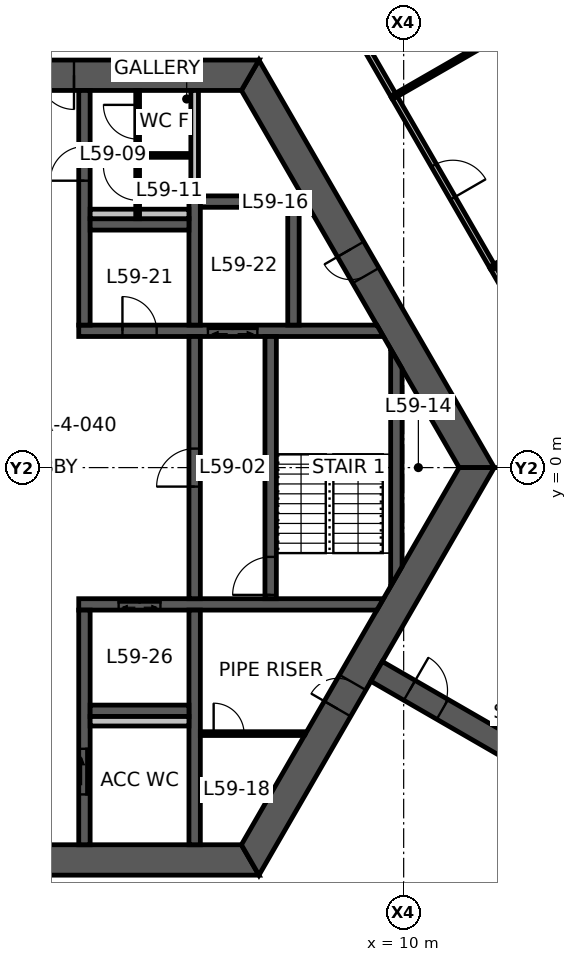
"""IFC4 building model, lengths in metres.
Left out: names, types, materials, properties, quantities, classifications, styles, units other than length and angle.
Written with IfcOpenShell. Run it as: python <this file> out.ifc"""

import sys

from ifc_helpers import new_model, si_unit, direction, frame, frame_2d, origin, place, context, subcontext, project, spatial, polyline, rectangle, outline, extrude, element, fill, save


model = new_model("IFC4")
c1 = context("Model", 3, precision=1e-05, world=origin(), true_north=direction((0.0, 1.0)))
c2 = subcontext(c1, "Body", "Model", "MODEL_VIEW")
j1 = project(units=[si_unit("LENGTHUNIT", "METRE"), si_unit("PLANEANGLEUNIT", "RADIAN")], contexts=[c1])
p1 = place(None, origin())
s1 = spatial("IfcSite", under=j1, at=p1, CompositionType="ELEMENT")
p2 = place(p1, origin())
s2 = spatial("IfcBuilding", under=s1, at=p2, CompositionType="ELEMENT")
p3 = place(p2, frame((0.0, 0.0, 236.2)))
s3 = spatial("IfcBuildingStorey", under=s2, at=p3, CompositionType="ELEMENT", Elevation=236.2)
p4 = place(p3, frame((11.922, 0.0, 0.0), z_axis=(0.0, 0.0, 1.0), x_axis=(-0.500004296715, 0.866022923061, 0.0)))
e1 = element("IfcWall", 1, at=p4, inside=s3, PredefinedType="SHEAR", context=c2, shape_type="SweptSolid", body=[
    extrude(outline(polyline([(-0.231, -0.4), (5.835, -0.4), (6.635, -0.4), (12.153, -0.4), (11.691, 0.4), (6.635, 0.4), (5.835, 0.4), (0.231, 0.4), (-0.231, -0.4)])), origin(), (0.0, 0.0, 1.0), 3.9),
])
p5 = place(p4, frame((5.835, 0.0, 0.0)))
e2 = element("IfcOpeningElement", 2, at=p5, cuts=e1, PredefinedType="OPENING", context=c2, shape_type="SweptSolid", body=[
    extrude(rectangle(XDim=0.8, YDim=2.1, at=frame_2d((0.4, 1.05))), frame((0.0, 0.41, 0.0), z_axis=(0.0, -1.0, 0.0), x_axis=(1.0, 0.0, 0.0)), (0.0, 0.0, 1.0), 0.82),
])
p6 = place(p3, frame((5.961, 10.325, 0.0), z_axis=(0.0, 0.0, 1.0), x_axis=(-1.0, 0.0, 0.0)))
e3 = element("IfcWall", 3, at=p6, inside=s3, PredefinedType="SHEAR", context=c2, shape_type="SweptSolid", body=[
    extrude(outline(polyline([(-0.231, -0.4), (4.636, -0.4), (5.536, -0.4), (6.386, -0.4), (7.286, -0.4), (12.153, -0.4), (11.691, 0.4), (7.286, 0.4), (6.386, 0.4), (5.536, 0.4), (4.636, 0.4), (0.231, 0.4), (-0.231, -0.4)])), origin(), (0.0, 0.0, 1.0), 3.9),
])
p7 = place(p6, frame((6.386, 0.0, 0.0)))
e4 = element("IfcOpeningElement", 4, at=p7, cuts=e3, PredefinedType="OPENING", context=c2, shape_type="SweptSolid", body=[
    extrude(rectangle(XDim=0.9, YDim=2.1, at=frame_2d((0.45, 1.05))), frame((0.0, 0.41, 0.0), z_axis=(0.0, -1.0, 0.0), x_axis=(1.0, 0.0, 0.0)), (0.0, 0.0, 1.0), 0.82),
])
p8 = place(p6, frame((4.636, 0.0, 0.0)))
e5 = element("IfcOpeningElement", 5, at=p8, cuts=e3, PredefinedType="OPENING", context=c2, shape_type="SweptSolid", body=[
    extrude(rectangle(XDim=0.9, YDim=2.1, at=frame_2d((0.45, 1.05))), frame((0.0, 0.41, 0.0), z_axis=(0.0, -1.0, 0.0), x_axis=(1.0, 0.0, 0.0)), (0.0, 0.0, 1.0), 0.82),
])
p9 = place(p3, frame((-5.961, -10.325, 0.0), z_axis=(0.0, 0.0, 1.0), x_axis=(1.0, 0.0, 0.0)))
e6 = element("IfcWall", 6, at=p9, inside=s3, PredefinedType="SHEAR", context=c2, shape_type="SweptSolid", body=[
    extrude(outline(polyline([(-0.231, -0.4), (5.461, -0.4), (6.461, -0.4), (12.153, -0.4), (11.691, 0.4), (6.461, 0.4), (5.461, 0.4), (0.231, 0.4), (-0.231, -0.4)])), origin(), (0.0, 0.0, 1.0), 3.9),
])
p10 = place(p9, frame((5.461, 0.0, 0.0)))
e7 = element("IfcOpeningElement", 7, at=p10, cuts=e6, PredefinedType="OPENING", context=c2, shape_type="SweptSolid", body=[
    extrude(rectangle(XDim=1.0, YDim=2.1, at=frame_2d((0.5, 1.05))), frame((0.0, 0.41, 0.0), z_axis=(0.0, -1.0, 0.0), x_axis=(1.0, 0.0, 0.0)), (0.0, 0.0, 1.0), 0.82),
])
p11 = place(p3, frame((5.961, -10.325, 0.0), z_axis=(0.0, 0.0, 1.0), x_axis=(0.500004296715, 0.866022923061, 0.0)))
e8 = element("IfcWall", 8, at=p11, inside=s3, PredefinedType="SHEAR", context=c2, shape_type="SweptSolid", body=[
    extrude(outline(polyline([(-0.231, -0.4), (4.594, -0.4), (5.394, -0.4), (12.153, -0.4), (11.691, 0.4), (5.394, 0.4), (4.594, 0.4), (0.231, 0.4), (-0.231, -0.4)])), origin(), (0.0, 0.0, 1.0), 3.9),
])
p12 = place(p11, frame((4.594, 0.0, 0.0)))
e9 = element("IfcOpeningElement", 9, at=p12, cuts=e8, PredefinedType="OPENING", context=c2, shape_type="SweptSolid", body=[
    extrude(rectangle(XDim=0.8, YDim=2.1, at=frame_2d((0.4, 1.05))), frame((0.0, 0.41, 0.0), z_axis=(0.0, -1.0, 0.0), x_axis=(1.0, 0.0, 0.0)), (0.0, 0.0, 1.0), 0.82),
])
p13 = place(p3, frame((9.288, -5.363, 0.0), z_axis=(0.0, 0.0, 1.0), x_axis=(0.866031736626, -0.499989031036, 0.0)))
e10 = element("IfcWall", 10, at=p13, inside=s3, PredefinedType="SHEAR", context=c2, shape_type="SweptSolid", body=[
    extrude(rectangle(XDim=7.796, YDim=0.6, at=frame_2d((3.898, 0.0))), origin(), (0.0, 0.0, 1.0), 3.9),
])
p14 = place(p13, frame((1.0, 0.0, 0.0)))
e11 = element("IfcOpeningElement", 11, at=p14, cuts=e10, PredefinedType="OPENING", context=c2, shape_type="SweptSolid", body=[
    extrude(rectangle(XDim=1.0, YDim=2.1, at=frame_2d((0.5, 1.05))), frame((0.0, 0.31, 0.0), z_axis=(0.0, -1.0, 0.0), x_axis=(1.0, 0.0, 0.0)), (0.0, 0.0, 1.0), 0.62),
])
p15 = place(p3, frame((1.45, 3.6, 0.0), z_axis=(0.0, 0.0, 1.0), x_axis=(1.0, 0.0, 0.0)))
e12 = element("IfcWall", 12, at=p15, inside=s3, PredefinedType="SHEAR", context=c2, shape_type="SweptSolid", body=[
    extrude(outline(polyline([(0.0, -0.15), (1.15, -0.15), (2.05, -0.15), (3.4, -0.15), (4.7, -0.15), (8.019, -0.15), (7.845, 0.15), (4.7, 0.15), (3.4, 0.15), (2.05, 0.15), (1.15, 0.15), (0.0, 0.15), (0.0, -0.15)])), origin(), (0.0, 0.0, 1.0), 3.9),
])
p16 = place(p15, frame((1.15, 0.0, 0.0)))
e13 = element("IfcOpeningElement", 13, at=p16, cuts=e12, PredefinedType="OPENING", context=c2, shape_type="SweptSolid", body=[
    extrude(rectangle(XDim=0.9, YDim=2.1, at=frame_2d((0.45, 1.05))), frame((0.0, 0.16, 0.0), z_axis=(0.0, -1.0, 0.0), x_axis=(1.0, 0.0, 0.0)), (0.0, 0.0, 1.0), 0.32),
])
p17 = place(p15, frame((3.4, 0.0, 0.0)))
e14 = element("IfcOpeningElement", 14, at=p17, cuts=e12, PredefinedType="OPENING", context=c2, shape_type="SweptSolid", body=[
    extrude(rectangle(XDim=1.3, YDim=2.1, at=frame_2d((0.65, 1.05))), frame((0.0, 0.16, 0.0), z_axis=(0.0, -1.0, 0.0), x_axis=(1.0, 0.0, 0.0)), (0.0, 0.0, 1.0), 0.32),
])
p18 = place(p3, frame((1.45, -3.6, 0.0), z_axis=(0.0, 0.0, 1.0), x_axis=(1.0, 0.0, 0.0)))
e15 = element("IfcWall", 15, at=p18, inside=s3, PredefinedType="SHEAR", context=c2, shape_type="SweptSolid", body=[
    extrude(outline(polyline([(0.0, -0.15), (1.05, -0.15), (2.15, -0.15), (7.845, -0.15), (8.019, 0.15), (2.15, 0.15), (1.05, 0.15), (0.0, 0.15), (0.0, -0.15)])), origin(), (0.0, 0.0, 1.0), 3.9),
])
p19 = place(p18, frame((1.05, 0.0, 0.0)))
e16 = element("IfcOpeningElement", 16, at=p19, cuts=e15, PredefinedType="OPENING", context=c2, shape_type="SweptSolid", body=[
    extrude(rectangle(XDim=1.1, YDim=2.1, at=frame_2d((0.55, 1.05))), frame((0.0, 0.16, 0.0), z_axis=(0.0, -1.0, 0.0), x_axis=(1.0, 0.0, 0.0)), (0.0, 0.0, 1.0), 0.32),
])
p20 = place(p3, frame((1.6, 3.75, 0.0), z_axis=(0.0, 0.0, 1.0), x_axis=(0.0, 1.0, 0.0)))
e17 = element("IfcWall", 17, at=p20, inside=s3, PredefinedType="SHEAR", context=c2, shape_type="SweptSolid", body=[
    extrude(rectangle(XDim=6.175, YDim=0.3, at=frame_2d((3.087, 0.0))), origin(), (0.0, 0.0, 1.0), 3.9),
])
p21 = place(p20, frame((3.8, 0.0, 0.0)))
e18 = element("IfcOpeningElement", 18, at=p21, cuts=e17, PredefinedType="OPENING", context=c2, shape_type="SweptSolid", body=[
    extrude(rectangle(XDim=0.9, YDim=2.1, at=frame_2d((0.45, 1.05))), frame((0.0, 0.16, 0.0), z_axis=(0.0, -1.0, 0.0), x_axis=(1.0, 0.0, 0.0)), (0.0, 0.0, 1.0), 0.32),
])
p22 = place(p3, frame((1.6, -3.75, 0.0), z_axis=(0.0, 0.0, 1.0), x_axis=(0.0, -1.0, 0.0)))
e19 = element("IfcWall", 19, at=p22, inside=s3, PredefinedType="SHEAR", context=c2, shape_type="SweptSolid", body=[
    extrude(rectangle(XDim=6.175, YDim=0.3, at=frame_2d((3.087, 0.0))), origin(), (0.0, 0.0, 1.0), 3.9),
])
p23 = place(p22, frame((3.65, 0.0, 0.0)))
e20 = element("IfcOpeningElement", 20, at=p23, cuts=e19, PredefinedType="OPENING", context=c2, shape_type="SweptSolid", body=[
    extrude(rectangle(XDim=1.2, YDim=2.1, at=frame_2d((0.6, 1.05))), frame((0.0, 0.16, 0.0), z_axis=(0.0, -1.0, 0.0), x_axis=(1.0, 0.0, 0.0)), (0.0, 0.0, 1.0), 0.32),
])
p24 = place(p3, frame((4.5, -3.45, 0.0), z_axis=(0.0, 0.0, 1.0), x_axis=(0.0, 1.0, 0.0)))
e21 = element("IfcWall", 21, at=p24, inside=s3, PredefinedType="SHEAR", context=c2, shape_type="SweptSolid", body=[
    extrude(rectangle(XDim=6.9, YDim=0.3, at=frame_2d((3.45, 0.0))), origin(), (0.0, 0.0, 1.0), 3.9),
])
p25 = place(p24, frame((2.95, 0.0, 0.0)))
e22 = element("IfcOpeningElement", 22, at=p25, cuts=e21, PredefinedType="OPENING", context=c2, shape_type="SweptSolid", body=[
    extrude(rectangle(XDim=1.0, YDim=2.1, at=frame_2d((0.5, 1.05))), frame((0.0, 0.16, 0.0), z_axis=(0.0, -1.0, 0.0), x_axis=(1.0, 0.0, 0.0)), (0.0, 0.0, 1.0), 0.32),
])
p26 = place(p3, frame((6.5, -3.45, 0.0), z_axis=(0.0, 0.0, 1.0), x_axis=(0.0, 1.0, 0.0)))
e23 = element("IfcWall", 23, at=p26, inside=s3, PredefinedType="SHEAR", context=c2, shape_type="SweptSolid", body=[
    extrude(rectangle(XDim=6.9, YDim=0.3, at=frame_2d((3.45, 0.0))), origin(), (0.0, 0.0, 1.0), 3.9),
])
p27 = place(p26, frame((0.1, 0.0, 0.0)))
e24 = element("IfcOpeningElement", 24, at=p27, cuts=e23, PredefinedType="OPENING", context=c2, shape_type="SweptSolid", body=[
    extrude(rectangle(XDim=1.0, YDim=2.1, at=frame_2d((0.5, 1.05))), frame((0.0, 0.16, 0.0), z_axis=(0.0, -1.0, 0.0), x_axis=(1.0, 0.0, 0.0)), (0.0, 0.0, 1.0), 0.32),
])
p28 = place(p3, frame((4.5, 3.75, 0.0), z_axis=(0.0, 0.0, 1.0), x_axis=(0.0, 1.0, 0.0)))
e25 = element("IfcWall", 25, at=p28, inside=s3, PredefinedType="SHEAR", context=c2, shape_type="SweptSolid", body=[
    extrude(rectangle(XDim=3.4, YDim=0.3, at=frame_2d((1.7, 0.0))), origin(), (0.0, 0.0, 1.0), 3.9),
])
p29 = place(p3, frame((4.5, -3.75, 0.0), z_axis=(0.0, 0.0, 1.0), x_axis=(0.0, -1.0, 0.0)))
e26 = element("IfcWall", 26, at=p29, inside=s3, PredefinedType="SHEAR", context=c2, shape_type="SweptSolid", body=[
    extrude(rectangle(XDim=6.175, YDim=0.3, at=frame_2d((3.087, 0.0))), origin(), (0.0, 0.0, 1.0), 3.9),
])
for number, where, z_axis, x_axis in (
    (27, (1.75, 6.4, 0.0), (0.0, 0.0, 1.0), (1.0, 0.0, 0.0)),
    (28, (1.75, -6.4, 0.0), (0.0, 0.0, 1.0), (1.0, 0.0, 0.0)),
    (29, (4.65, 7.0, 0.0), (0.0, 0.0, 1.0), (1.0, 0.0, 0.0)),
):
    element("IfcWall", number, at=place(p3, frame(where, z_axis=z_axis, x_axis=x_axis)), inside=s3, PredefinedType="SHEAR", context=c2, shape_type="SweptSolid", body=[
        extrude(rectangle(XDim=2.6, YDim=0.3, at=frame_2d((1.3, 0.0))), origin(), (0.0, 0.0, 1.0), 3.9),
    ])
p30 = place(p3, frame((7.1, 3.75, 0.0), z_axis=(0.0, 0.0, 1.0), x_axis=(0.0, 1.0, 0.0)))
e30 = element("IfcWall", 30, at=p30, inside=s3, PredefinedType="SHEAR", context=c2, shape_type="SweptSolid", body=[
    extrude(rectangle(XDim=3.1, YDim=0.3, at=frame_2d((1.55, 0.0))), origin(), (0.0, 0.0, 1.0), 3.9),
])
p31 = place(p3, frame((9.808, -2.862, 0.0), z_axis=(0.0, 0.0, 1.0), x_axis=(0.0, 1.0, 0.0)))
e31 = element("IfcWall", 31, at=p31, inside=s3, PredefinedType="SHEAR", context=c2, shape_type="SweptSolid", body=[
    extrude(outline(polyline([(0.26, -0.15), (5.465, -0.15), (5.984, 0.15), (-0.26, 0.15), (0.26, -0.15)])), origin(), (0.0, 0.0, 1.0), 3.9),
])
p32 = place(p3, frame((4.5, 7.15, 0.0), z_axis=(0.0, 0.0, 1.0), x_axis=(0.0, 1.0, 0.0)))
e32 = element("IfcWall", 32, at=p32, inside=s3, PredefinedType="STANDARD", context=c2, shape_type="SweptSolid", body=[
    extrude(rectangle(XDim=2.775, YDim=0.2, at=frame_2d((1.388, 0.0))), origin(), (0.0, 0.0, 1.0), 3.9),
])
for number, where, z_axis, x_axis in (
    (33, (1.75, 6.675, 0.0), (0.0, 0.0, 1.0), (1.0, 0.0, 0.0)),
    (34, (1.75, -6.675, 0.0), (0.0, 0.0, 1.0), (1.0, 0.0, 0.0)),
):
    element("IfcWall", number, at=place(p3, frame(where, z_axis=z_axis, x_axis=x_axis)), inside=s3, PredefinedType="PLUMBINGWALL", context=c2, shape_type="SweptSolid", body=[
        extrude(rectangle(XDim=2.6, YDim=0.25, at=frame_2d((1.3, 0.0))), origin(), (0.0, 0.0, 1.0), 3.9),
    ])
p33 = place(p3, frame((3.0, 6.55, 0.0), z_axis=(0.0, 0.0, 1.0), x_axis=(0.0, 1.0, 0.0)))
e35 = element("IfcWall", 35, at=p33, inside=s3, PredefinedType="PARTITIONING", context=c2, shape_type="SweptSolid", body=[
    extrude(rectangle(XDim=3.375, YDim=0.1, at=frame_2d((1.688, 0.0))), origin(), (0.0, 0.0, 1.0), 2.95),
])
p34 = place(p33, frame((2.095, 0.0, 0.0)))
e36 = element("IfcOpeningElement", 36, at=p34, cuts=e35, PredefinedType="OPENING", context=c2, shape_type="SweptSolid", body=[
    extrude(rectangle(XDim=0.9, YDim=2.1, at=frame_2d((0.45, 1.05))), frame((0.0, 0.06, 0.0), z_axis=(0.0, -1.0, 0.0), x_axis=(1.0, 0.0, 0.0)), (0.0, 0.0, 1.0), 0.12),
])
p35 = place(p33, frame((0.483, 0.0, 0.0)))
e37 = element("IfcOpeningElement", 37, at=p35, cuts=e35, PredefinedType="OPENING", context=c2, shape_type="SweptSolid", body=[
    extrude(rectangle(XDim=0.9, YDim=2.1, at=frame_2d((0.45, 1.05))), frame((0.0, 0.06, 0.0), z_axis=(0.0, -1.0, 0.0), x_axis=(1.0, 0.0, 0.0)), (0.0, 0.0, 1.0), 0.12),
])
p36 = place(p3, frame((3.05, 8.215, 0.0), z_axis=(0.0, 0.0, 1.0), x_axis=(1.0, 0.0, 0.0)))
e38 = element("IfcWall", 38, at=p36, inside=s3, PredefinedType="PARTITIONING", context=c2, shape_type="SweptSolid", body=[
    extrude(rectangle(XDim=1.3, YDim=0.1, at=frame_2d((0.65, 0.0))), origin(), (0.0, 0.0, 1.0), 2.95),
])
p37 = place(p3, frame((4.65, -7.0, 0.0), z_axis=(0.0, 0.0, 1.0), x_axis=(1.0, 0.0, 0.0)))
e39 = element("IfcWall", 39, at=p37, inside=s3, PredefinedType="PARTITIONING", context=c2, shape_type="SweptSolid", body=[
    extrude(outline(polyline([(0.0, -0.05), (0.35, -0.05), (1.15, -0.05), (2.74, -0.05), (2.769, 0.0), (2.775, 0.05), (1.15, 0.05), (0.35, 0.05), (0.0, 0.05), (0.0, -0.05)])), origin(), (0.0, 0.0, 1.0), 2.95),
])
p38 = place(p37, frame((0.35, 0.0, 0.0)))
e40 = element("IfcOpeningElement", 40, at=p38, cuts=e39, PredefinedType="OPENING", context=c2, shape_type="SweptSolid", body=[
    extrude(rectangle(XDim=0.8, YDim=2.1, at=frame_2d((0.4, 1.05))), frame((0.0, 0.06, 0.0), z_axis=(0.0, -1.0, 0.0), x_axis=(1.0, 0.0, 0.0)), (0.0, 0.0, 1.0), 0.12),
])
p39 = place(p3, frame((12.337, 5.281, 0.0), z_axis=(0.0, 0.0, 1.0), x_axis=(0.499977562641, -0.866038357612, 0.0)))
e41 = element("IfcWall", 41, at=p39, inside=s3, PredefinedType="PARTITIONING", context=c2, shape_type="SweptSolid", body=[
    extrude(rectangle(XDim=3.01, YDim=0.15, at=frame_2d((1.505, 0.0))), origin(), (0.0, 0.0, 1.0), 2.95),
])
p40 = place(p3, frame((8.08, 12.656, 0.0), z_axis=(0.0, 0.0, 1.0), x_axis=(0.499990242038, -0.866031037473, 0.0)))
e42 = element("IfcWall", 42, at=p40, inside=s3, PredefinedType="PARTITIONING", context=c2, shape_type="SweptSolid", body=[
    extrude(rectangle(XDim=3.341, YDim=0.15, at=frame_2d((1.67, 0.0))), origin(), (0.0, 0.0, 1.0), 2.95),
])
p41 = place(p3, frame((9.745, 9.771, 0.0), z_axis=(0.0, 0.0, 1.0), x_axis=(0.499981525251, -0.866036069923, 0.0)))
e43 = element("IfcWall", 43, at=p41, inside=s3, PredefinedType="PARTITIONING", context=c2, shape_type="SweptSolid", body=[
    extrude(rectangle(XDim=5.194, YDim=0.15, at=frame_2d((2.597, 0.0))), origin(), (0.0, 0.0, 1.0), 2.95),
])
p42 = place(p41, frame((2.097, 0.0, 0.0)))
e44 = element("IfcOpeningElement", 44, at=p42, cuts=e43, PredefinedType="OPENING", context=c2, shape_type="SweptSolid", body=[
    extrude(rectangle(XDim=1.0, YDim=2.1, at=frame_2d((0.5, 1.05))), frame((0.0, 0.085, 0.0), z_axis=(0.0, -1.0, 0.0), x_axis=(1.0, 0.0, 0.0)), (0.0, 0.0, 1.0), 0.17),
])
p43 = place(p3, frame((12.342, 5.273, 0.0), z_axis=(0.0, 0.0, 1.0), x_axis=(0.865195372903, 0.501434907746, 0.0)))
e45 = element("IfcWall", 45, at=p43, inside=s3, PredefinedType="PARTITIONING", context=c2, shape_type="SweptSolid", body=[
    extrude(rectangle(XDim=2.8, YDim=0.1, at=frame_2d((1.4, 0.0))), origin(), (0.0, 0.0, 1.0), 2.95),
])
p44 = place(p3, frame((13.623, 12.004, 0.0), z_axis=(0.0, 0.0, 1.0), x_axis=(-0.866535947524, -0.499114667835, 0.0)))
e46 = element("IfcWall", 46, at=p44, inside=s3, PredefinedType="PARTITIONING", context=c2, shape_type="SweptSolid", body=[
    extrude(rectangle(XDim=4.475, YDim=0.1, at=frame_2d((2.238, 0.0))), origin(), (0.0, 0.0, 1.0), 2.95),
])
p45 = place(p8, origin())
e47 = element("IfcDoor", 47, at=p45, inside=s3, OperationType="SINGLE_SWING_LEFT", PredefinedType="DOOR", context=c2, shape_type="SweptSolid", body=[
    extrude(rectangle(XDim=0.9, YDim=2.1, at=frame_2d((0.45, 1.05))), frame((0.0, 0.025, 0.0), z_axis=(0.0, -1.0, 0.0), x_axis=(1.0, 0.0, 0.0)), (0.0, 0.0, 1.0), 0.05),
])
fill(e5, e47)
p46 = place(p5, origin())
e48 = element("IfcDoor", 48, at=p46, inside=s3, OperationType="SINGLE_SWING_RIGHT", PredefinedType="DOOR", context=c2, shape_type="SweptSolid", body=[
    extrude(rectangle(XDim=0.8, YDim=2.1, at=frame_2d((0.4, 1.05))), frame((0.0, 0.025, 0.0), z_axis=(0.0, -1.0, 0.0), x_axis=(1.0, 0.0, 0.0)), (0.0, 0.0, 1.0), 0.05),
])
fill(e2, e48)
p47 = place(p12, origin())
e49 = element("IfcDoor", 49, at=p47, inside=s3, OperationType="SINGLE_SWING_LEFT", PredefinedType="DOOR", context=c2, shape_type="SweptSolid", body=[
    extrude(rectangle(XDim=0.8, YDim=2.1, at=frame_2d((0.4, 1.05))), frame((0.0, 0.025, 0.0), z_axis=(0.0, -1.0, 0.0), x_axis=(1.0, 0.0, 0.0)), (0.0, 0.0, 1.0), 0.05),
])
fill(e9, e49)
p48 = place(p25, origin())
e50 = element("IfcDoor", 50, at=p48, inside=s3, OperationType="SINGLE_SWING_LEFT", PredefinedType="DOOR", context=c2, shape_type="SweptSolid", body=[
    extrude(rectangle(XDim=1.0, YDim=2.1, at=frame_2d((0.5, 1.05))), frame((0.0, 0.025, 0.0), z_axis=(0.0, -1.0, 0.0), x_axis=(1.0, 0.0, 0.0)), (0.0, 0.0, 1.0), 0.05),
])
fill(e22, e50)
p49 = place(p27, origin())
e51 = element("IfcDoor", 51, at=p49, inside=s3, OperationType="SINGLE_SWING_LEFT", PredefinedType="DOOR", context=c2, shape_type="SweptSolid", body=[
    extrude(rectangle(XDim=1.0, YDim=2.1, at=frame_2d((0.5, 1.05))), frame((0.0, 0.025, 0.0), z_axis=(0.0, -1.0, 0.0), x_axis=(1.0, 0.0, 0.0)), (0.0, 0.0, 1.0), 0.05),
])
fill(e24, e51)
p50 = place(p21, origin())
e52 = element("IfcDoor", 52, at=p50, inside=s3, OperationType="SINGLE_SWING_LEFT", PredefinedType="DOOR", context=c2, shape_type="SweptSolid", body=[
    extrude(rectangle(XDim=0.9, YDim=2.1, at=frame_2d((0.45, 1.05))), frame((0.0, 0.025, 0.0), z_axis=(0.0, -1.0, 0.0), x_axis=(1.0, 0.0, 0.0)), (0.0, 0.0, 1.0), 0.05),
])
fill(e18, e52)
p51 = place(p23, origin())
e53 = element("IfcDoor", 53, at=p51, inside=s3, OperationType="SLIDING_TO_LEFT", PredefinedType="DOOR", context=c2, shape_type="SweptSolid", body=[
    extrude(rectangle(XDim=1.2, YDim=2.1, at=frame_2d((0.6, 1.05))), frame((0.0, 0.025, 0.0), z_axis=(0.0, -1.0, 0.0), x_axis=(1.0, 0.0, 0.0)), (0.0, 0.0, 1.0), 0.05),
])
fill(e20, e53)
p52 = place(p16, origin())
e54 = element("IfcDoor", 54, at=p52, inside=s3, OperationType="SINGLE_SWING_LEFT", PredefinedType="DOOR", context=c2, shape_type="SweptSolid", body=[
    extrude(rectangle(XDim=0.9, YDim=2.1, at=frame_2d((0.45, 1.05))), frame((0.0, 0.025, 0.0), z_axis=(0.0, -1.0, 0.0), x_axis=(1.0, 0.0, 0.0)), (0.0, 0.0, 1.0), 0.05),
])
fill(e13, e54)
p53 = place(p14, origin())
e55 = element("IfcDoor", 55, at=p53, inside=s3, OperationType="SINGLE_SWING_LEFT", PredefinedType="DOOR", context=c2, shape_type="SweptSolid", body=[
    extrude(rectangle(XDim=1.0, YDim=2.1, at=frame_2d((0.5, 1.05))), frame((0.0, 0.025, 0.0), z_axis=(0.0, -1.0, 0.0), x_axis=(1.0, 0.0, 0.0)), (0.0, 0.0, 1.0), 0.05),
])
fill(e11, e55)
p54 = place(p34, origin())
e56 = element("IfcDoor", 56, at=p54, inside=s3, OperationType="SINGLE_SWING_RIGHT", PredefinedType="DOOR", context=c2, shape_type="SweptSolid", body=[
    extrude(rectangle(XDim=0.9, YDim=2.1, at=frame_2d((0.45, 1.05))), frame((0.0, 0.025, 0.0), z_axis=(0.0, -1.0, 0.0), x_axis=(1.0, 0.0, 0.0)), (0.0, 0.0, 1.0), 0.05),
])
fill(e36, e56)
p55 = place(p35, origin())
e57 = element("IfcDoor", 57, at=p55, inside=s3, OperationType="SINGLE_SWING_RIGHT", PredefinedType="DOOR", context=c2, shape_type="SweptSolid", body=[
    extrude(rectangle(XDim=0.9, YDim=2.1, at=frame_2d((0.45, 1.05))), frame((0.0, 0.025, 0.0), z_axis=(0.0, -1.0, 0.0), x_axis=(1.0, 0.0, 0.0)), (0.0, 0.0, 1.0), 0.05),
])
fill(e37, e57)
p56 = place(p38, origin())
e58 = element("IfcDoor", 58, at=p56, inside=s3, OperationType="SINGLE_SWING_LEFT", PredefinedType="DOOR", context=c2, shape_type="SweptSolid", body=[
    extrude(rectangle(XDim=0.8, YDim=2.1, at=frame_2d((0.4, 1.05))), frame((0.0, 0.025, 0.0), z_axis=(0.0, -1.0, 0.0), x_axis=(1.0, 0.0, 0.0)), (0.0, 0.0, 1.0), 0.05),
])
fill(e40, e58)
p57 = place(p42, origin())
e59 = element("IfcDoor", 59, at=p57, inside=s3, OperationType="SINGLE_SWING_RIGHT", PredefinedType="DOOR", context=c2, shape_type="SweptSolid", body=[
    extrude(rectangle(XDim=1.0, YDim=2.1, at=frame_2d((0.5, 1.05))), frame((0.0, 0.025, 0.0), z_axis=(0.0, -1.0, 0.0), x_axis=(1.0, 0.0, 0.0)), (0.0, 0.0, 1.0), 0.05),
])
fill(e44, e59)
p58 = place(p19, origin())
e60 = element("IfcDoor", 60, at=p58, inside=s3, OperationType="DOUBLE_DOOR_SLIDING", PredefinedType="DOOR", context=c2, shape_type="SweptSolid", body=[
    extrude(rectangle(XDim=1.1, YDim=2.1, at=frame_2d((0.55, 1.05))), frame((0.0, 0.025, 0.0), z_axis=(0.0, -1.0, 0.0), x_axis=(1.0, 0.0, 0.0)), (0.0, 0.0, 1.0), 0.05),
])
fill(e16, e60)
p59 = place(p17, origin())
e61 = element("IfcDoor", 61, at=p59, inside=s3, OperationType="DOUBLE_DOOR_SLIDING", PredefinedType="DOOR", context=c2, shape_type="SweptSolid", body=[
    extrude(rectangle(XDim=1.3, YDim=2.1, at=frame_2d((0.65, 1.05))), frame((0.0, 0.025, 0.0), z_axis=(0.0, -1.0, 0.0), x_axis=(1.0, 0.0, 0.0)), (0.0, 0.0, 1.0), 0.05),
])
fill(e14, e61)
save(model, sys.argv[1])
